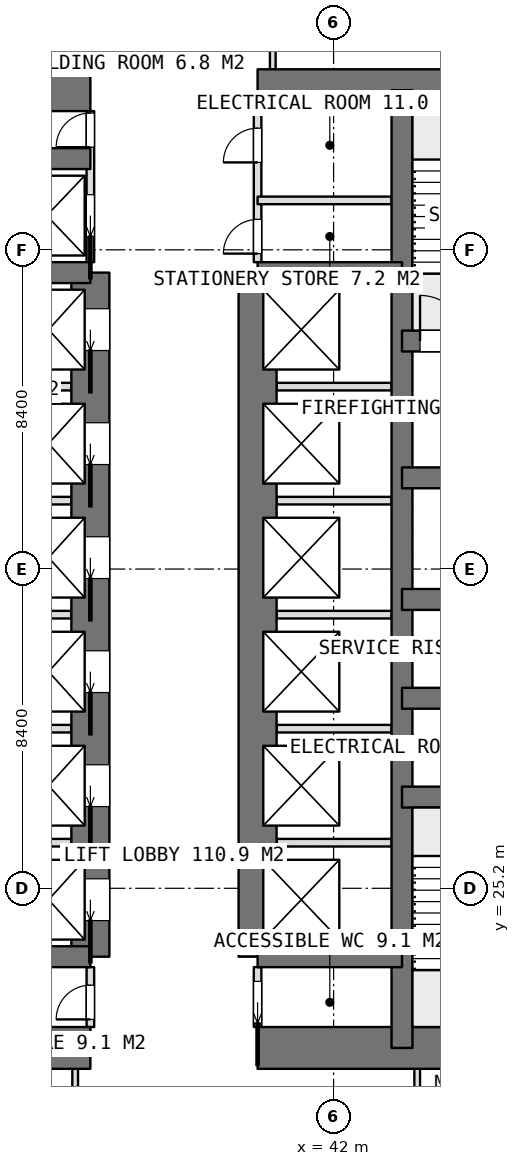
"""IFC4 building model, lengths in metres.
Left out: names, types, materials, properties, quantities, classifications, styles, units other than length and angle.
Written with IfcOpenShell. Run it as: python <this file> out.ifc"""

import sys

from ifc_helpers import new_model, si_unit, direction, frame, frame_2d, origin, place, context, subcontext, project, spatial, rectangle, extrude, element, fill, save


model = new_model("IFC4")
c1 = context("Model", 3, precision=1e-05, world=origin(), true_north=direction((0.0, 1.0)))
c2 = subcontext(c1, "Body", "Model", "MODEL_VIEW")
j1 = project(units=[si_unit("LENGTHUNIT", "METRE"), si_unit("PLANEANGLEUNIT", "RADIAN")], contexts=[c1])
p1 = place(None, origin())
s1 = spatial("IfcSite", under=j1, at=p1, CompositionType="ELEMENT")
p2 = place(p1, origin())
s2 = spatial("IfcBuilding", under=s1, at=p2, CompositionType="ELEMENT")
p3 = place(p2, frame((0.0, 0.0, 74.15)))
s3 = spatial("IfcBuildingStorey", under=s2, at=p3, CompositionType="ELEMENT", Elevation=74.15)
p4 = place(p3, frame((25.2, 21.0, 0.0), z_axis=(0.0, 0.0, 1.0), x_axis=(1.0, 0.0, 0.0)))
e1 = element("IfcWall", 1, at=p4, inside=s3, PredefinedType="SHEAR", context=c2, shape_type="SweptSolid", body=[
    extrude(rectangle(XDim=10.4, YDim=1.1, at=frame_2d((5.2, 0.0))), origin(), (0.0, 0.0, 1.0), 3.75),
])
p5 = place(p3, frame((40.0, 21.0, 0.0), z_axis=(0.0, 0.0, 1.0), x_axis=(1.0, 0.0, 0.0)))
e2 = element("IfcWall", 2, at=p5, inside=s3, PredefinedType="SHEAR", context=c2, shape_type="SweptSolid", body=[
    extrude(rectangle(XDim=10.4, YDim=1.1, at=frame_2d((5.2, 0.0))), origin(), (0.0, 0.0, 1.0), 3.75),
])
p6 = place(p3, frame((25.2, 46.2, 0.0), z_axis=(0.0, 0.0, 1.0), x_axis=(1.0, 0.0, 0.0)))
e3 = element("IfcWall", 3, at=p6, inside=s3, PredefinedType="SHEAR", context=c2, shape_type="SweptSolid", body=[
    extrude(rectangle(XDim=10.4, YDim=1.1, at=frame_2d((5.2, 0.0))), origin(), (0.0, 0.0, 1.0), 3.75),
])
p7 = place(p3, frame((40.0, 46.2, 0.0), z_axis=(0.0, 0.0, 1.0), x_axis=(1.0, 0.0, 0.0)))
e4 = element("IfcWall", 4, at=p7, inside=s3, PredefinedType="SHEAR", context=c2, shape_type="SweptSolid", body=[
    extrude(rectangle(XDim=10.4, YDim=1.1, at=frame_2d((5.2, 0.0))), origin(), (0.0, 0.0, 1.0), 3.75),
])
p8 = place(p3, frame((43.8, 21.0, 0.0), z_axis=(0.0, 0.0, 1.0), x_axis=(0.0, 1.0, 0.0)))
e5 = element("IfcWall", 5, at=p8, inside=s3, PredefinedType="SHEAR", context=c2, shape_type="SweptSolid", body=[
    extrude(rectangle(XDim=25.2, YDim=0.55, at=frame_2d((12.6, 0.0))), origin(), (0.0, 0.0, 1.0), 3.75),
])
p9 = place(p3, frame((35.6, 23.4, 0.0), z_axis=(0.0, 0.0, 1.0), x_axis=(0.0, 1.0, 0.0)))
e6 = element("IfcWall", 6, at=p9, inside=s3, PredefinedType="SHEAR", context=c2, shape_type="SweptSolid", body=[
    extrude(rectangle(XDim=18.0, YDim=1.0, at=frame_2d((9.0, 0.0))), origin(), (0.0, 0.0, 1.0), 3.75),
])
p10 = place(p9, frame((0.95, 0.0, 0.0)))
e7 = element("IfcOpeningElement", 7, at=p10, cuts=e6, PredefinedType="OPENING", context=c2, shape_type="SweptSolid", body=[
    extrude(rectangle(XDim=1.1, YDim=2.1, at=frame_2d((0.55, 1.05))), frame((0.0, 0.51, 0.0), z_axis=(0.0, -1.0, 0.0), x_axis=(1.0, 0.0, 0.0)), (0.0, 0.0, 1.0), 1.02),
])
p11 = place(p9, frame((3.95, 0.0, 0.0)))
e8 = element("IfcOpeningElement", 8, at=p11, cuts=e6, PredefinedType="OPENING", context=c2, shape_type="SweptSolid", body=[
    extrude(rectangle(XDim=1.1, YDim=2.1, at=frame_2d((0.55, 1.05))), frame((0.0, 0.51, 0.0), z_axis=(0.0, -1.0, 0.0), x_axis=(1.0, 0.0, 0.0)), (0.0, 0.0, 1.0), 1.02),
])
p12 = place(p9, frame((6.95, 0.0, 0.0)))
e9 = element("IfcOpeningElement", 9, at=p12, cuts=e6, PredefinedType="OPENING", context=c2, shape_type="SweptSolid", body=[
    extrude(rectangle(XDim=1.1, YDim=2.1, at=frame_2d((0.55, 1.05))), frame((0.0, 0.51, 0.0), z_axis=(0.0, -1.0, 0.0), x_axis=(1.0, 0.0, 0.0)), (0.0, 0.0, 1.0), 1.02),
])
p13 = place(p9, frame((9.95, 0.0, 0.0)))
e10 = element("IfcOpeningElement", 10, at=p13, cuts=e6, PredefinedType="OPENING", context=c2, shape_type="SweptSolid", body=[
    extrude(rectangle(XDim=1.1, YDim=2.1, at=frame_2d((0.55, 1.05))), frame((0.0, 0.51, 0.0), z_axis=(0.0, -1.0, 0.0), x_axis=(1.0, 0.0, 0.0)), (0.0, 0.0, 1.0), 1.02),
])
p14 = place(p9, frame((12.95, 0.0, 0.0)))
e11 = element("IfcOpeningElement", 11, at=p14, cuts=e6, PredefinedType="OPENING", context=c2, shape_type="SweptSolid", body=[
    extrude(rectangle(XDim=1.1, YDim=2.1, at=frame_2d((0.55, 1.05))), frame((0.0, 0.51, 0.0), z_axis=(0.0, -1.0, 0.0), x_axis=(1.0, 0.0, 0.0)), (0.0, 0.0, 1.0), 1.02),
])
p15 = place(p9, frame((15.95, 0.0, 0.0)))
e12 = element("IfcOpeningElement", 12, at=p15, cuts=e6, PredefinedType="OPENING", context=c2, shape_type="SweptSolid", body=[
    extrude(rectangle(XDim=1.1, YDim=2.1, at=frame_2d((0.55, 1.05))), frame((0.0, 0.51, 0.0), z_axis=(0.0, -1.0, 0.0), x_axis=(1.0, 0.0, 0.0)), (0.0, 0.0, 1.0), 1.02),
])
p16 = place(p3, frame((40.0, 23.4, 0.0), z_axis=(0.0, 0.0, 1.0), x_axis=(0.0, 1.0, 0.0)))
e13 = element("IfcWall", 13, at=p16, inside=s3, PredefinedType="SHEAR", context=c2, shape_type="SweptSolid", body=[
    extrude(rectangle(XDim=18.0, YDim=1.0, at=frame_2d((9.0, 0.0))), origin(), (0.0, 0.0, 1.0), 3.75),
])
for number, where, z_axis, x_axis in (
    (14, (31.8, 23.4, 0.0), (0.0, 0.0, 1.0), (1.0, 0.0, 0.0)),
    (15, (31.8, 41.4, 0.0), (0.0, 0.0, 1.0), (1.0, 0.0, 0.0)),
    (16, (31.8, 44.4, 0.0), (0.0, 0.0, 1.0), (1.0, 0.0, 0.0)),
    (17, (40.0, 23.4, 0.0), (0.0, 0.0, 1.0), (1.0, 0.0, 0.0)),
    (18, (40.0, 41.4, 0.0), (0.0, 0.0, 1.0), (1.0, 0.0, 0.0)),
):
    element("IfcWall", number, at=place(p3, frame(where, z_axis=z_axis, x_axis=x_axis)), inside=s3, PredefinedType="SHEAR", context=c2, shape_type="SweptSolid", body=[
        extrude(rectangle(XDim=3.8, YDim=0.55, at=frame_2d((1.9, 0.0))), origin(), (0.0, 0.0, 1.0), 3.75),
    ])
for number, where, z_axis, x_axis in (
    (19, (43.8, 27.6, 0.0), (0.0, 0.0, 1.0), (1.0, 0.0, 0.0)),
    (20, (43.8, 30.2, 0.0), (0.0, 0.0, 1.0), (1.0, 0.0, 0.0)),
    (21, (43.8, 32.8, 0.0), (0.0, 0.0, 1.0), (1.0, 0.0, 0.0)),
):
    element("IfcWall", number, at=place(p3, frame(where, z_axis=z_axis, x_axis=x_axis)), inside=s3, PredefinedType="SHEAR", context=c2, shape_type="SweptSolid", body=[
        extrude(rectangle(XDim=6.6, YDim=0.55, at=frame_2d((3.3, 0.0))), origin(), (0.0, 0.0, 1.0), 3.75),
    ])
p17 = place(p3, frame((43.8, 36.0, 0.0), z_axis=(0.0, 0.0, 1.0), x_axis=(1.0, 0.0, 0.0)))
e22 = element("IfcWall", 22, at=p17, inside=s3, PredefinedType="SHEAR", context=c2, shape_type="SweptSolid", body=[
    extrude(rectangle(XDim=6.6, YDim=0.55, at=frame_2d((3.3, 0.0))), origin(), (0.0, 0.0, 1.0), 3.75),
])
p18 = place(p17, frame((2.65, 0.0, 0.0)))
e23 = element("IfcOpeningElement", 23, at=p18, cuts=e22, PredefinedType="OPENING", context=c2, shape_type="SweptSolid", body=[
    extrude(rectangle(XDim=1.3, YDim=2.1, at=frame_2d((0.65, 1.05))), frame((0.0, 0.285, 0.0), z_axis=(0.0, -1.0, 0.0), x_axis=(1.0, 0.0, 0.0)), (0.0, 0.0, 1.0), 0.57),
])
p19 = place(p3, frame((43.8, 39.6, 0.0), z_axis=(0.0, 0.0, 1.0), x_axis=(1.0, 0.0, 0.0)))
e24 = element("IfcWall", 24, at=p19, inside=s3, PredefinedType="SHEAR", context=c2, shape_type="SweptSolid", body=[
    extrude(rectangle(XDim=6.6, YDim=0.55, at=frame_2d((3.3, 0.0))), origin(), (0.0, 0.0, 1.0), 3.75),
])
p20 = place(p19, frame((0.475, 0.0, 0.0)))
e25 = element("IfcOpeningElement", 25, at=p20, cuts=e24, PredefinedType="OPENING", context=c2, shape_type="SweptSolid", body=[
    extrude(rectangle(XDim=1.2, YDim=2.1, at=frame_2d((0.6, 1.05))), frame((0.0, 0.285, 0.0), z_axis=(0.0, -1.0, 0.0), x_axis=(1.0, 0.0, 0.0)), (0.0, 0.0, 1.0), 0.57),
])
for number, where, z_axis, x_axis in (
    (26, (32.075, 26.4, 0.0), (0.0, 0.0, 1.0), (1.0, 0.0, 0.0)),
    (27, (32.075, 29.4, 0.0), (0.0, 0.0, 1.0), (1.0, 0.0, 0.0)),
    (28, (32.075, 32.4, 0.0), (0.0, 0.0, 1.0), (1.0, 0.0, 0.0)),
    (29, (32.075, 35.4, 0.0), (0.0, 0.0, 1.0), (1.0, 0.0, 0.0)),
    (30, (32.075, 38.4, 0.0), (0.0, 0.0, 1.0), (1.0, 0.0, 0.0)),
):
    element("IfcWall", number, at=place(p3, frame(where, z_axis=z_axis, x_axis=x_axis)), inside=s3, PredefinedType="PARTITIONING", context=c2, shape_type="SweptSolid", body=[
        extrude(rectangle(XDim=3.025, YDim=0.2, at=frame_2d((1.513, 0.0))), origin(), (0.0, 0.0, 1.0), 3.5),
    ])
for number, where, z_axis, x_axis in (
    (31, (40.5, 26.4, 0.0), (0.0, 0.0, 1.0), (1.0, 0.0, 0.0)),
    (32, (40.5, 29.4, 0.0), (0.0, 0.0, 1.0), (1.0, 0.0, 0.0)),
    (33, (40.5, 32.4, 0.0), (0.0, 0.0, 1.0), (1.0, 0.0, 0.0)),
    (34, (40.5, 35.4, 0.0), (0.0, 0.0, 1.0), (1.0, 0.0, 0.0)),
    (35, (40.5, 38.4, 0.0), (0.0, 0.0, 1.0), (1.0, 0.0, 0.0)),
):
    element("IfcWall", number, at=place(p3, frame(where, z_axis=z_axis, x_axis=x_axis)), inside=s3, PredefinedType="PARTITIONING", context=c2, shape_type="SweptSolid", body=[
        extrude(rectangle(XDim=3.025, YDim=0.2, at=frame_2d((1.512, 0.0))), origin(), (0.0, 0.0, 1.0), 3.5),
    ])
p21 = place(p3, frame((40.0, 21.55, 0.0), z_axis=(0.0, 0.0, 1.0), x_axis=(0.0, 1.0, 0.0)))
e36 = element("IfcWall", 36, at=p21, inside=s3, PredefinedType="PARTITIONING", context=c2, shape_type="SweptSolid", body=[
    extrude(rectangle(XDim=1.575, YDim=0.2, at=frame_2d((0.788, 0.0))), origin(), (0.0, 0.0, 1.0), 3.5),
])
p22 = place(p21, frame((0.1, 0.0, 0.0)))
e37 = element("IfcOpeningElement", 37, at=p22, cuts=e36, PredefinedType="OPENING", context=c2, shape_type="SweptSolid", body=[
    extrude(rectangle(XDim=1.1, YDim=2.1, at=frame_2d((0.55, 1.05))), frame((0.0, 0.11, 0.0), z_axis=(0.0, -1.0, 0.0), x_axis=(1.0, 0.0, 0.0)), (0.0, 0.0, 1.0), 0.22),
])
p23 = place(p3, frame((40.0, 41.675, 0.0), z_axis=(0.0, 0.0, 1.0), x_axis=(0.0, 1.0, 0.0)))
e38 = element("IfcWall", 38, at=p23, inside=s3, PredefinedType="PARTITIONING", context=c2, shape_type="SweptSolid", body=[
    extrude(rectangle(XDim=3.975, YDim=0.2, at=frame_2d((1.987, 0.0))), origin(), (0.0, 0.0, 1.0), 3.5),
])
p24 = place(p23, frame((2.625, 0.0, 0.0)))
e39 = element("IfcOpeningElement", 39, at=p24, cuts=e38, PredefinedType="OPENING", context=c2, shape_type="SweptSolid", body=[
    extrude(rectangle(XDim=0.9, YDim=2.1, at=frame_2d((0.45, 1.05))), frame((0.0, 0.11, 0.0), z_axis=(0.0, -1.0, 0.0), x_axis=(1.0, 0.0, 0.0)), (0.0, 0.0, 1.0), 0.22),
])
p25 = place(p23, frame((0.225, 0.0, 0.0)))
e40 = element("IfcOpeningElement", 40, at=p25, cuts=e38, PredefinedType="OPENING", context=c2, shape_type="SweptSolid", body=[
    extrude(rectangle(XDim=0.9, YDim=2.1, at=frame_2d((0.45, 1.05))), frame((0.0, 0.11, 0.0), z_axis=(0.0, -1.0, 0.0), x_axis=(1.0, 0.0, 0.0)), (0.0, 0.0, 1.0), 0.22),
])
p26 = place(p3, frame((35.6, 41.675, 0.0), z_axis=(0.0, 0.0, 1.0), x_axis=(0.0, 1.0, 0.0)))
e41 = element("IfcWall", 41, at=p26, inside=s3, PredefinedType="PARTITIONING", context=c2, shape_type="SweptSolid", body=[
    extrude(rectangle(XDim=3.975, YDim=0.2, at=frame_2d((1.987, 0.0))), origin(), (0.0, 0.0, 1.0), 3.5),
])
p27 = place(p26, frame((3.025, 0.0, 0.0)))
e42 = element("IfcOpeningElement", 42, at=p27, cuts=e41, PredefinedType="OPENING", context=c2, shape_type="SweptSolid", body=[
    extrude(rectangle(XDim=0.9, YDim=2.1, at=frame_2d((0.45, 1.05))), frame((0.0, 0.11, 0.0), z_axis=(0.0, -1.0, 0.0), x_axis=(1.0, 0.0, 0.0)), (0.0, 0.0, 1.0), 0.22),
])
p28 = place(p26, frame((0.675, 0.0, 0.0)))
e43 = element("IfcOpeningElement", 43, at=p28, cuts=e41, PredefinedType="OPENING", context=c2, shape_type="SweptSolid", body=[
    extrude(rectangle(XDim=1.1, YDim=2.1, at=frame_2d((0.55, 1.05))), frame((0.0, 0.11, 0.0), z_axis=(0.0, -1.0, 0.0), x_axis=(1.0, 0.0, 0.0)), (0.0, 0.0, 1.0), 0.22),
])
p29 = place(p3, frame((35.6, 21.55, 0.0), z_axis=(0.0, 0.0, 1.0), x_axis=(0.0, 1.0, 0.0)))
e44 = element("IfcWall", 44, at=p29, inside=s3, PredefinedType="PARTITIONING", context=c2, shape_type="SweptSolid", body=[
    extrude(rectangle(XDim=1.575, YDim=0.2, at=frame_2d((0.788, 0.0))), origin(), (0.0, 0.0, 1.0), 3.5),
])
p30 = place(p29, frame((0.2, 0.0, 0.0)))
e45 = element("IfcOpeningElement", 45, at=p30, cuts=e44, PredefinedType="OPENING", context=c2, shape_type="SweptSolid", body=[
    extrude(rectangle(XDim=0.9, YDim=2.1, at=frame_2d((0.45, 1.05))), frame((0.0, 0.11, 0.0), z_axis=(0.0, -1.0, 0.0), x_axis=(1.0, 0.0, 0.0)), (0.0, 0.0, 1.0), 0.22),
])
p31 = place(p3, frame((40.0, 43.3, 0.0), z_axis=(0.0, 0.0, 1.0), x_axis=(1.0, 0.0, 0.0)))
e46 = element("IfcWall", 46, at=p31, inside=s3, PredefinedType="PARTITIONING", context=c2, shape_type="SweptSolid", body=[
    extrude(rectangle(XDim=3.525, YDim=0.2, at=frame_2d((1.762, 0.0))), origin(), (0.0, 0.0, 1.0), 3.5),
])
for number, where, z_axis, x_axis in (
    (47, (40.4, 46.75, 0.0), (0.0, 0.0, 1.0), (0.0, 1.0, 0.0)),
    (48, (35.2, 46.75, 0.0), (0.0, 0.0, 1.0), (0.0, 1.0, 0.0)),
    (49, (35.2, 17.875, 0.0), (0.0, 0.0, 1.0), (0.0, 1.0, 0.0)),
    (50, (44.2, 17.875, 0.0), (0.0, 0.0, 1.0), (0.0, 1.0, 0.0)),
):
    element("IfcWall", number, at=place(p3, frame(where, z_axis=z_axis, x_axis=x_axis)), inside=s3, PredefinedType="PARTITIONING", context=c2, shape_type="SweptSolid", body=[
        extrude(rectangle(XDim=2.575, YDim=0.15, at=frame_2d((1.288, 0.0))), origin(), (0.0, 0.0, 1.0), 3.5),
    ])
p32 = place(p22, origin())
e51 = element("IfcDoor", 51, at=p32, inside=s3, OperationType="SLIDING_TO_LEFT", PredefinedType="DOOR", context=c2, shape_type="SweptSolid", body=[
    extrude(rectangle(XDim=1.1, YDim=2.1, at=frame_2d((0.55, 1.05))), frame((0.0, 0.025, 0.0), z_axis=(0.0, -1.0, 0.0), x_axis=(1.0, 0.0, 0.0)), (0.0, 0.0, 1.0), 0.05),
])
fill(e37, e51)
p33 = place(p30, origin())
e52 = element("IfcDoor", 52, at=p33, inside=s3, OperationType="SINGLE_SWING_LEFT", PredefinedType="DOOR", context=c2, shape_type="SweptSolid", body=[
    extrude(rectangle(XDim=0.9, YDim=2.1, at=frame_2d((0.45, 1.05))), frame((0.0, 0.025, 0.0), z_axis=(0.0, -1.0, 0.0), x_axis=(1.0, 0.0, 0.0)), (0.0, 0.0, 1.0), 0.05),
])
fill(e45, e52)
p34 = place(p24, origin())
e53 = element("IfcDoor", 53, at=p34, inside=s3, OperationType="SINGLE_SWING_LEFT", PredefinedType="DOOR", context=c2, shape_type="SweptSolid", body=[
    extrude(rectangle(XDim=0.9, YDim=2.1, at=frame_2d((0.45, 1.05))), frame((0.0, 0.025, 0.0), z_axis=(0.0, -1.0, 0.0), x_axis=(1.0, 0.0, 0.0)), (0.0, 0.0, 1.0), 0.05),
])
fill(e39, e53)
p35 = place(p25, origin())
e54 = element("IfcDoor", 54, at=p35, inside=s3, OperationType="SINGLE_SWING_LEFT", PredefinedType="DOOR", context=c2, shape_type="SweptSolid", body=[
    extrude(rectangle(XDim=0.9, YDim=2.1, at=frame_2d((0.45, 1.05))), frame((0.0, 0.025, 0.0), z_axis=(0.0, -1.0, 0.0), x_axis=(1.0, 0.0, 0.0)), (0.0, 0.0, 1.0), 0.05),
])
fill(e40, e54)
p36 = place(p27, origin())
e55 = element("IfcDoor", 55, at=p36, inside=s3, OperationType="SINGLE_SWING_LEFT", PredefinedType="DOOR", context=c2, shape_type="SweptSolid", body=[
    extrude(rectangle(XDim=0.9, YDim=2.1, at=frame_2d((0.45, 1.05))), frame((0.0, 0.025, 0.0), z_axis=(0.0, -1.0, 0.0), x_axis=(1.0, 0.0, 0.0)), (0.0, 0.0, 1.0), 0.05),
])
fill(e42, e55)
p37 = place(p10, origin())
e56 = element("IfcDoor", 56, at=p37, inside=s3, OperationType="SLIDING_TO_LEFT", PredefinedType="USERDEFINED", context=c2, shape_type="SweptSolid", body=[
    extrude(rectangle(XDim=1.1, YDim=2.1, at=frame_2d((0.55, 1.05))), frame((0.0, 0.025, 0.0), z_axis=(0.0, -1.0, 0.0), x_axis=(1.0, 0.0, 0.0)), (0.0, 0.0, 1.0), 0.05),
])
fill(e7, e56)
p38 = place(p11, origin())
e57 = element("IfcDoor", 57, at=p38, inside=s3, OperationType="SLIDING_TO_LEFT", PredefinedType="USERDEFINED", context=c2, shape_type="SweptSolid", body=[
    extrude(rectangle(XDim=1.1, YDim=2.1, at=frame_2d((0.55, 1.05))), frame((0.0, 0.025, 0.0), z_axis=(0.0, -1.0, 0.0), x_axis=(1.0, 0.0, 0.0)), (0.0, 0.0, 1.0), 0.05),
])
fill(e8, e57)
p39 = place(p12, origin())
e58 = element("IfcDoor", 58, at=p39, inside=s3, OperationType="SLIDING_TO_LEFT", PredefinedType="USERDEFINED", context=c2, shape_type="SweptSolid", body=[
    extrude(rectangle(XDim=1.1, YDim=2.1, at=frame_2d((0.55, 1.05))), frame((0.0, 0.025, 0.0), z_axis=(0.0, -1.0, 0.0), x_axis=(1.0, 0.0, 0.0)), (0.0, 0.0, 1.0), 0.05),
])
fill(e9, e58)
p40 = place(p13, origin())
e59 = element("IfcDoor", 59, at=p40, inside=s3, OperationType="SLIDING_TO_LEFT", PredefinedType="USERDEFINED", context=c2, shape_type="SweptSolid", body=[
    extrude(rectangle(XDim=1.1, YDim=2.1, at=frame_2d((0.55, 1.05))), frame((0.0, 0.025, 0.0), z_axis=(0.0, -1.0, 0.0), x_axis=(1.0, 0.0, 0.0)), (0.0, 0.0, 1.0), 0.05),
])
fill(e10, e59)
p41 = place(p14, origin())
e60 = element("IfcDoor", 60, at=p41, inside=s3, OperationType="SLIDING_TO_LEFT", PredefinedType="USERDEFINED", context=c2, shape_type="SweptSolid", body=[
    extrude(rectangle(XDim=1.1, YDim=2.1, at=frame_2d((0.55, 1.05))), frame((0.0, 0.025, 0.0), z_axis=(0.0, -1.0, 0.0), x_axis=(1.0, 0.0, 0.0)), (0.0, 0.0, 1.0), 0.05),
])
fill(e11, e60)
p42 = place(p15, origin())
e61 = element("IfcDoor", 61, at=p42, inside=s3, OperationType="SLIDING_TO_LEFT", PredefinedType="USERDEFINED", context=c2, shape_type="SweptSolid", body=[
    extrude(rectangle(XDim=1.1, YDim=2.1, at=frame_2d((0.55, 1.05))), frame((0.0, 0.025, 0.0), z_axis=(0.0, -1.0, 0.0), x_axis=(1.0, 0.0, 0.0)), (0.0, 0.0, 1.0), 0.05),
])
fill(e12, e61)
p43 = place(p28, origin())
e62 = element("IfcDoor", 62, at=p43, inside=s3, OperationType="SLIDING_TO_LEFT", PredefinedType="USERDEFINED", context=c2, shape_type="SweptSolid", body=[
    extrude(rectangle(XDim=1.1, YDim=2.1, at=frame_2d((0.55, 1.05))), frame((0.0, 0.025, 0.0), z_axis=(0.0, -1.0, 0.0), x_axis=(1.0, 0.0, 0.0)), (0.0, 0.0, 1.0), 0.05),
])
fill(e43, e62)
p44 = place(p20, origin())
e63 = element("IfcDoor", 63, at=p44, inside=s3, OperationType="SINGLE_SWING_RIGHT", PredefinedType="DOOR", context=c2, shape_type="SweptSolid", body=[
    extrude(rectangle(XDim=1.2, YDim=2.1, at=frame_2d((0.6, 1.05))), frame((0.0, 0.025, 0.0), z_axis=(0.0, -1.0, 0.0), x_axis=(1.0, 0.0, 0.0)), (0.0, 0.0, 1.0), 0.05),
])
fill(e25, e63)
save(model, sys.argv[1])
